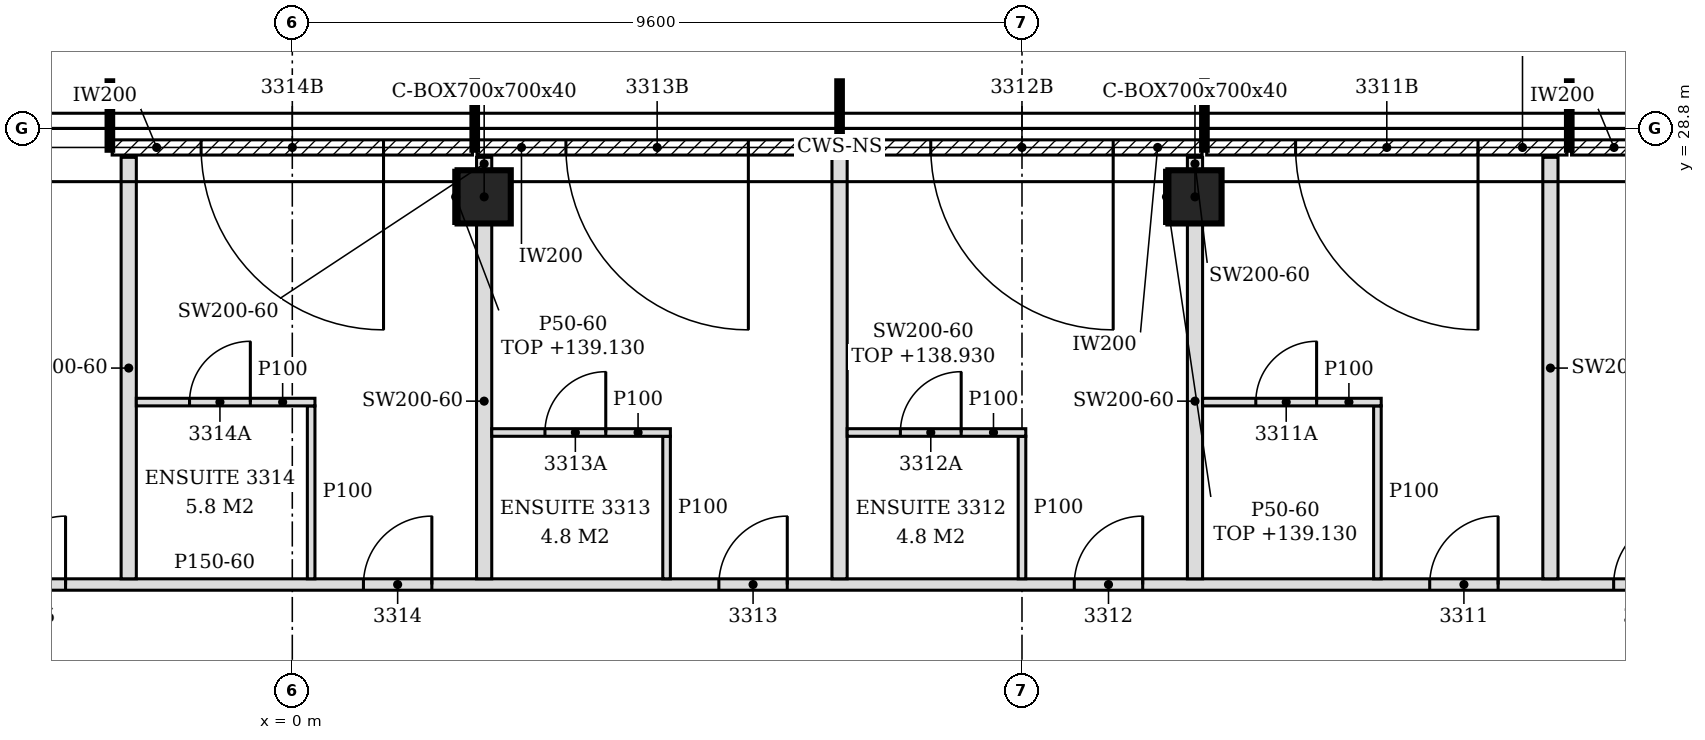
"""IFC4 building model, lengths in metres.
Left out: names, types, materials, properties, quantities, classifications, styles, units other than length and angle.
Written with IfcOpenShell. Run it as: python <this file> out.ifc"""

import sys

from ifc_helpers import new_model, si_unit, direction, frame, frame_2d, origin, origin_2d, place, context, subcontext, project, spatial, polyline, rectangle, hollow_rectangle, outline, extrude, element, fill, save


model = new_model("IFC4")
c1 = context("Model", 3, precision=1e-05, world=origin(), true_north=direction((0.0, 1.0)))
c2 = subcontext(c1, "Body", "Model", "MODEL_VIEW")
j1 = project(units=[si_unit("LENGTHUNIT", "METRE"), si_unit("PLANEANGLEUNIT", "RADIAN")], contexts=[c1])
p1 = place(None, origin())
s1 = spatial("IfcSite", under=j1, at=p1, CompositionType="ELEMENT")
p2 = place(p1, origin())
s2 = spatial("IfcBuilding", under=s1, at=p2, CompositionType="ELEMENT")
p3 = place(p2, frame((0.0, 0.0, 136.2)))
s3 = spatial("IfcBuildingStorey", under=s2, at=p3, CompositionType="ELEMENT", Elevation=136.2)
for number, where, z_axis, x_axis in (
    (1, (11.876, 27.9, -0.15), (0.0, 0.0, 1.0), (1.0, 0.0, 0.0)),
    (2, (2.524, 27.9, -0.15), (0.0, 0.0, 1.0), (1.0, 0.0, 0.0)),
):
    element("IfcColumn", number, at=place(p3, frame(where, z_axis=z_axis, x_axis=x_axis)), inside=s3, PredefinedType="COLUMN", context=c2, shape_type="SweptSolid", body=[
        extrude(hollow_rectangle(XDim=0.7, YDim=0.7, WallThickness=0.04, at=origin_2d()), origin(), (0.0, 0.0, 1.0), 3.6),
    ])
p4 = place(p3, frame((21.457, 28.55, 0.0), z_axis=(0.0, 0.0, 1.0), x_axis=(-1.0, 0.0, 0.0)))
e3 = element("IfcWall", 3, at=p4, inside=s3, PredefinedType="NOTDEFINED", context=c2, shape_type="SweptSolid", body=[
    extrude(rectangle(XDim=4.626, YDim=0.2, at=frame_2d((2.313, 0.0))), origin(), (0.0, 0.0, 1.0), 3.45),
])
p5 = place(p4, frame((1.108, 0.0, 0.0)))
e4 = element("IfcOpeningElement", 4, at=p5, cuts=e3, PredefinedType="OPENING", context=c2, shape_type="SweptSolid", body=[
    extrude(rectangle(XDim=2.4, YDim=2.4, at=frame_2d((1.2, 1.2))), frame((0.0, 0.11, 0.0), z_axis=(0.0, -1.0, 0.0), x_axis=(1.0, 0.0, 0.0)), (0.0, 0.0, 1.0), 0.22),
])
p6 = place(p3, frame((16.77, 28.55, 0.0), z_axis=(0.0, 0.0, 1.0), x_axis=(-1.0, 0.0, 0.0)))
e5 = element("IfcWall", 5, at=p6, inside=s3, PredefinedType="NOTDEFINED", context=c2, shape_type="SweptSolid", body=[
    extrude(rectangle(XDim=4.74, YDim=0.2, at=frame_2d((2.37, 0.0))), origin(), (0.0, 0.0, 1.0), 3.45),
])
p7 = place(p6, frame((1.17, 0.0, 0.0)))
e6 = element("IfcOpeningElement", 6, at=p7, cuts=e5, PredefinedType="OPENING", context=c2, shape_type="SweptSolid", body=[
    extrude(rectangle(XDim=2.4, YDim=2.4, at=frame_2d((1.2, 1.2))), frame((0.0, 0.11, 0.0), z_axis=(0.0, -1.0, 0.0), x_axis=(1.0, 0.0, 0.0)), (0.0, 0.0, 1.0), 0.22),
])
p8 = place(p3, frame((11.97, 28.55, 0.0), z_axis=(0.0, 0.0, 1.0), x_axis=(-1.0, 0.0, 0.0)))
e7 = element("IfcWall", 7, at=p8, inside=s3, PredefinedType="NOTDEFINED", context=c2, shape_type="SweptSolid", body=[
    extrude(rectangle(XDim=4.74, YDim=0.2, at=frame_2d((2.37, 0.0))), origin(), (0.0, 0.0, 1.0), 3.45),
])
p9 = place(p8, frame((1.17, 0.0, 0.0)))
e8 = element("IfcOpeningElement", 8, at=p9, cuts=e7, PredefinedType="OPENING", context=c2, shape_type="SweptSolid", body=[
    extrude(rectangle(XDim=2.4, YDim=2.4, at=frame_2d((1.2, 1.2))), frame((0.0, 0.11, 0.0), z_axis=(0.0, -1.0, 0.0), x_axis=(1.0, 0.0, 0.0)), (0.0, 0.0, 1.0), 0.22),
])
p10 = place(p3, frame((7.17, 28.55, 0.0), z_axis=(0.0, 0.0, 1.0), x_axis=(-1.0, 0.0, 0.0)))
e9 = element("IfcWall", 9, at=p10, inside=s3, PredefinedType="NOTDEFINED", context=c2, shape_type="SweptSolid", body=[
    extrude(rectangle(XDim=4.74, YDim=0.2, at=frame_2d((2.37, 0.0))), origin(), (0.0, 0.0, 1.0), 3.45),
])
p11 = place(p10, frame((1.17, 0.0, 0.0)))
e10 = element("IfcOpeningElement", 10, at=p11, cuts=e9, PredefinedType="OPENING", context=c2, shape_type="SweptSolid", body=[
    extrude(rectangle(XDim=2.4, YDim=2.4, at=frame_2d((1.2, 1.2))), frame((0.0, 0.11, 0.0), z_axis=(0.0, -1.0, 0.0), x_axis=(1.0, 0.0, 0.0)), (0.0, 0.0, 1.0), 0.22),
])
p12 = place(p3, frame((2.37, 28.55, 0.0), z_axis=(0.0, 0.0, 1.0), x_axis=(-1.0, 0.0, 0.0)))
e11 = element("IfcWall", 11, at=p12, inside=s3, PredefinedType="NOTDEFINED", context=c2, shape_type="SweptSolid", body=[
    extrude(rectangle(XDim=4.74, YDim=0.2, at=frame_2d((2.37, 0.0))), origin(), (0.0, 0.0, 1.0), 3.45),
])
p13 = place(p12, frame((1.17, 0.0, 0.0)))
e12 = element("IfcOpeningElement", 12, at=p13, cuts=e11, PredefinedType="OPENING", context=c2, shape_type="SweptSolid", body=[
    extrude(rectangle(XDim=2.4, YDim=2.4, at=frame_2d((1.2, 1.2))), frame((0.0, 0.11, 0.0), z_axis=(0.0, -1.0, 0.0), x_axis=(1.0, 0.0, 0.0)), (0.0, 0.0, 1.0), 0.22),
])
p14 = place(p3, frame((-4.821, 22.8, 0.0), z_axis=(0.0, 0.0, 1.0), x_axis=(1.0, 0.0, 0.0)))
e13 = element("IfcWall", 13, at=p14, inside=s3, PredefinedType="PARTITIONING", context=c2, shape_type="SweptSolid", body=[
    extrude(outline(polyline([(0.0, 0.0), (24.042, 0.0), (24.042, 2.73), (23.871, 2.73), (23.869, 3.45), (12.171, 3.45), (12.169, 2.73), (11.871, 2.73), (11.869, 3.45), (0.171, 3.45), (0.169, 2.73), (0.0, 2.73), (0.0, 0.0)])), frame((0.0, 0.075, 0.0), z_axis=(0.0, -1.0, 0.0), x_axis=(1.0, 0.0, 0.0)), (0.0, 0.0, 1.0), 0.15),
])
p15 = place(p14, frame((22.205, 0.0, 0.0)))
e14 = element("IfcOpeningElement", 14, at=p15, cuts=e13, PredefinedType="OPENING", context=c2, shape_type="SweptSolid", body=[
    extrude(rectangle(XDim=0.9, YDim=2.1, at=frame_2d((0.45, 1.05))), frame((0.0, 0.085, 0.0), z_axis=(0.0, -1.0, 0.0), x_axis=(1.0, 0.0, 0.0)), (0.0, 0.0, 1.0), 0.17),
])
p16 = place(p14, frame((19.785, 0.0, 0.0)))
e15 = element("IfcOpeningElement", 15, at=p16, cuts=e13, PredefinedType="OPENING", context=c2, shape_type="SweptSolid", body=[
    extrude(rectangle(XDim=0.9, YDim=2.1, at=frame_2d((0.45, 1.05))), frame((0.0, 0.085, 0.0), z_axis=(0.0, -1.0, 0.0), x_axis=(1.0, 0.0, 0.0)), (0.0, 0.0, 1.0), 0.17),
])
p17 = place(p14, frame((15.109, 0.0, 0.0)))
e16 = element("IfcOpeningElement", 16, at=p17, cuts=e13, PredefinedType="OPENING", context=c2, shape_type="SweptSolid", body=[
    extrude(rectangle(XDim=0.9, YDim=2.1, at=frame_2d((0.45, 1.05))), frame((0.0, 0.085, 0.0), z_axis=(0.0, -1.0, 0.0), x_axis=(1.0, 0.0, 0.0)), (0.0, 0.0, 1.0), 0.17),
])
p18 = place(p14, frame((10.433, 0.0, 0.0)))
e17 = element("IfcOpeningElement", 17, at=p18, cuts=e13, PredefinedType="OPENING", context=c2, shape_type="SweptSolid", body=[
    extrude(rectangle(XDim=0.9, YDim=2.1, at=frame_2d((0.45, 1.05))), frame((0.0, 0.085, 0.0), z_axis=(0.0, -1.0, 0.0), x_axis=(1.0, 0.0, 0.0)), (0.0, 0.0, 1.0), 0.17),
])
p19 = place(p14, frame((5.757, 0.0, 0.0)))
e18 = element("IfcOpeningElement", 18, at=p19, cuts=e13, PredefinedType="OPENING", context=c2, shape_type="SweptSolid", body=[
    extrude(rectangle(XDim=0.9, YDim=2.1, at=frame_2d((0.45, 1.05))), frame((0.0, 0.085, 0.0), z_axis=(0.0, -1.0, 0.0), x_axis=(1.0, 0.0, 0.0)), (0.0, 0.0, 1.0), 0.17),
])
p20 = place(p14, frame((0.938, 0.0, 0.0)))
e19 = element("IfcOpeningElement", 19, at=p20, cuts=e13, PredefinedType="OPENING", context=c2, shape_type="SweptSolid", body=[
    extrude(rectangle(XDim=0.9, YDim=2.1, at=frame_2d((0.45, 1.05))), frame((0.0, 0.085, 0.0), z_axis=(0.0, -1.0, 0.0), x_axis=(1.0, 0.0, 0.0)), (0.0, 0.0, 1.0), 0.17),
])
p21 = place(p3, frame((-2.152, 22.875, 0.0), z_axis=(0.0, 0.0, 1.0), x_axis=(0.0, 1.0, 0.0)))
e20 = element("IfcWall", 20, at=p21, inside=s3, PredefinedType="PARTITIONING", context=c2, shape_type="SweptSolid", body=[
    extrude(outline(polyline([(0.0, 0.0), (5.545, 0.0), (5.545, 3.45), (5.175, 3.45), (5.173, 2.93), (4.875, 2.93), (4.873, 3.45), (1.23, 3.45), (1.228, 2.88), (1.02, 2.88), (1.018, 3.45), (0.0, 3.45), (0.0, 0.0)])), frame((0.0, 0.1, 0.0), z_axis=(0.0, -1.0, 0.0), x_axis=(1.0, 0.0, 0.0)), (0.0, 0.0, 1.0), 0.2),
])
p22 = place(p3, frame((0.248, 22.875, 0.0), z_axis=(0.0, 0.0, 1.0), x_axis=(0.0, 1.0, 0.0)))
e21 = element("IfcWall", 21, at=p22, inside=s3, PredefinedType="PARTITIONING", context=c2, shape_type="SweptSolid", body=[
    extrude(outline(polyline([(0.0, 0.0), (2.275, 0.0), (2.275, 3.45), (1.23, 3.45), (1.228, 2.88), (1.02, 2.88), (1.018, 3.45), (0.0, 3.45), (0.0, 0.0)])), frame((0.0, 0.05, 0.0), z_axis=(0.0, -1.0, 0.0), x_axis=(1.0, 0.0, 0.0)), (0.0, 0.0, 1.0), 0.1),
])
p23 = place(p3, frame((2.524, 22.875, 0.0), z_axis=(0.0, 0.0, 1.0), x_axis=(0.0, 1.0, 0.0)))
e22 = element("IfcWall", 22, at=p23, inside=s3, PredefinedType="PARTITIONING", context=c2, shape_type="SweptSolid", body=[
    extrude(outline(polyline([(0.0, 0.0), (4.675, 0.0), (4.675, 3.45), (1.23, 3.45), (1.228, 2.88), (1.02, 2.88), (1.018, 3.45), (0.0, 3.45), (0.0, 0.0)])), frame((0.0, 0.1, 0.0), z_axis=(0.0, -1.0, 0.0), x_axis=(1.0, 0.0, 0.0)), (0.0, 0.0, 1.0), 0.2),
])
p24 = place(p3, frame((4.924, 22.875, 0.0), z_axis=(0.0, 0.0, 1.0), x_axis=(0.0, 1.0, 0.0)))
e23 = element("IfcWall", 23, at=p24, inside=s3, PredefinedType="PARTITIONING", context=c2, shape_type="SweptSolid", body=[
    extrude(outline(polyline([(0.0, 0.0), (1.875, 0.0), (1.875, 3.45), (1.23, 3.45), (1.228, 2.88), (1.02, 2.88), (1.018, 3.45), (0.0, 3.45), (0.0, 0.0)])), frame((0.0, 0.05, 0.0), z_axis=(0.0, -1.0, 0.0), x_axis=(1.0, 0.0, 0.0)), (0.0, 0.0, 1.0), 0.1),
])
p25 = place(p3, frame((7.2, 22.875, 0.0), z_axis=(0.0, 0.0, 1.0), x_axis=(0.0, 1.0, 0.0)))
e24 = element("IfcWall", 24, at=p25, inside=s3, PredefinedType="PARTITIONING", context=c2, shape_type="SweptSolid", body=[
    extrude(rectangle(XDim=5.575, YDim=0.2, at=frame_2d((2.788, 0.0))), origin(), (0.0, 0.0, 1.0), 2.73),
])
p26 = place(p3, frame((9.6, 22.875, 0.0), z_axis=(0.0, 0.0, 1.0), x_axis=(0.0, 1.0, 0.0)))
e25 = element("IfcWall", 25, at=p26, inside=s3, PredefinedType="PARTITIONING", context=c2, shape_type="SweptSolid", body=[
    extrude(outline(polyline([(0.0, 0.0), (1.875, 0.0), (1.875, 3.45), (1.23, 3.45), (1.228, 2.88), (1.02, 2.88), (1.018, 3.45), (0.0, 3.45), (0.0, 0.0)])), frame((0.0, 0.05, 0.0), z_axis=(0.0, -1.0, 0.0), x_axis=(1.0, 0.0, 0.0)), (0.0, 0.0, 1.0), 0.1),
])
p27 = place(p3, frame((11.876, 22.875, 0.0), z_axis=(0.0, 0.0, 1.0), x_axis=(0.0, 1.0, 0.0)))
e26 = element("IfcWall", 26, at=p27, inside=s3, PredefinedType="PARTITIONING", context=c2, shape_type="SweptSolid", body=[
    extrude(outline(polyline([(0.0, 0.0), (4.675, 0.0), (4.675, 3.45), (1.23, 3.45), (1.228, 2.88), (1.02, 2.88), (1.018, 3.45), (0.0, 3.45), (0.0, 0.0)])), frame((0.0, 0.1, 0.0), z_axis=(0.0, -1.0, 0.0), x_axis=(1.0, 0.0, 0.0)), (0.0, 0.0, 1.0), 0.2),
])
p28 = place(p3, frame((14.276, 22.875, 0.0), z_axis=(0.0, 0.0, 1.0), x_axis=(0.0, 1.0, 0.0)))
e27 = element("IfcWall", 27, at=p28, inside=s3, PredefinedType="PARTITIONING", context=c2, shape_type="SweptSolid", body=[
    extrude(outline(polyline([(0.0, 0.0), (2.275, 0.0), (2.275, 3.45), (1.23, 3.45), (1.228, 2.88), (1.02, 2.88), (1.018, 3.45), (0.0, 3.45), (0.0, 0.0)])), frame((0.0, 0.05, 0.0), z_axis=(0.0, -1.0, 0.0), x_axis=(1.0, 0.0, 0.0)), (0.0, 0.0, 1.0), 0.1),
])
p29 = place(p3, frame((16.552, 22.875, 0.0), z_axis=(0.0, 0.0, 1.0), x_axis=(0.0, 1.0, 0.0)))
e28 = element("IfcWall", 28, at=p29, inside=s3, PredefinedType="PARTITIONING", context=c2, shape_type="SweptSolid", body=[
    extrude(outline(polyline([(0.0, 0.0), (5.545, 0.0), (5.545, 3.45), (5.175, 3.45), (5.173, 2.93), (4.875, 2.93), (4.873, 3.45), (1.23, 3.45), (1.228, 2.88), (1.02, 2.88), (1.018, 3.45), (0.0, 3.45), (0.0, 0.0)])), frame((0.0, 0.1, 0.0), z_axis=(0.0, -1.0, 0.0), x_axis=(1.0, 0.0, 0.0)), (0.0, 0.0, 1.0), 0.2),
])
p30 = place(p3, frame((2.624, 24.8, 0.0), z_axis=(0.0, 0.0, 1.0), x_axis=(1.0, 0.0, 0.0)))
e29 = element("IfcWall", 29, at=p30, inside=s3, PredefinedType="PARTITIONING", context=c2, shape_type="SweptSolid", body=[
    extrude(rectangle(XDim=2.35, YDim=0.1, at=frame_2d((1.175, 0.0))), origin(), (0.0, 0.0, 1.0), 3.45),
])
p31 = place(p30, frame((0.7, 0.0, 0.0)))
e30 = element("IfcOpeningElement", 30, at=p31, cuts=e29, PredefinedType="OPENING", context=c2, shape_type="SweptSolid", body=[
    extrude(rectangle(XDim=0.8, YDim=2.1, at=frame_2d((0.4, 1.05))), frame((0.0, 0.06, 0.0), z_axis=(0.0, -1.0, 0.0), x_axis=(1.0, 0.0, 0.0)), (0.0, 0.0, 1.0), 0.12),
])
p32 = place(p3, frame((7.3, 24.8, 0.0), z_axis=(0.0, 0.0, 1.0), x_axis=(1.0, 0.0, 0.0)))
e31 = element("IfcWall", 31, at=p32, inside=s3, PredefinedType="PARTITIONING", context=c2, shape_type="SweptSolid", body=[
    extrude(outline(polyline([(0.0, 0.0), (2.35, 0.0), (2.35, 3.45), (0.05, 3.45), (0.048, 2.73), (0.0, 2.73), (0.0, 0.0)])), frame((0.0, 0.05, 0.0), z_axis=(0.0, -1.0, 0.0), x_axis=(1.0, 0.0, 0.0)), (0.0, 0.0, 1.0), 0.1),
])
p33 = place(p32, frame((0.7, 0.0, 0.0)))
e32 = element("IfcOpeningElement", 32, at=p33, cuts=e31, PredefinedType="OPENING", context=c2, shape_type="SweptSolid", body=[
    extrude(rectangle(XDim=0.8, YDim=2.1, at=frame_2d((0.4, 1.05))), frame((0.0, 0.06, 0.0), z_axis=(0.0, -1.0, 0.0), x_axis=(1.0, 0.0, 0.0)), (0.0, 0.0, 1.0), 0.12),
])
p34 = place(p3, frame((-2.052, 25.2, 0.0), z_axis=(0.0, 0.0, 1.0), x_axis=(1.0, 0.0, 0.0)))
e33 = element("IfcWall", 33, at=p34, inside=s3, PredefinedType="PARTITIONING", context=c2, shape_type="SweptSolid", body=[
    extrude(rectangle(XDim=2.35, YDim=0.1, at=frame_2d((1.175, 0.0))), origin(), (0.0, 0.0, 1.0), 3.45),
])
p35 = place(p34, frame((0.7, 0.0, 0.0)))
e34 = element("IfcOpeningElement", 34, at=p35, cuts=e33, PredefinedType="OPENING", context=c2, shape_type="SweptSolid", body=[
    extrude(rectangle(XDim=0.8, YDim=2.1, at=frame_2d((0.4, 1.05))), frame((0.0, 0.06, 0.0), z_axis=(0.0, -1.0, 0.0), x_axis=(1.0, 0.0, 0.0)), (0.0, 0.0, 1.0), 0.12),
])
p36 = place(p3, frame((11.976, 25.2, 0.0), z_axis=(0.0, 0.0, 1.0), x_axis=(1.0, 0.0, 0.0)))
e35 = element("IfcWall", 35, at=p36, inside=s3, PredefinedType="PARTITIONING", context=c2, shape_type="SweptSolid", body=[
    extrude(rectangle(XDim=2.35, YDim=0.1, at=frame_2d((1.175, 0.0))), origin(), (0.0, 0.0, 1.0), 3.45),
])
p37 = place(p36, frame((0.7, 0.0, 0.0)))
e36 = element("IfcOpeningElement", 36, at=p37, cuts=e35, PredefinedType="OPENING", context=c2, shape_type="SweptSolid", body=[
    extrude(rectangle(XDim=0.8, YDim=2.1, at=frame_2d((0.4, 1.05))), frame((0.0, 0.06, 0.0), z_axis=(0.0, -1.0, 0.0), x_axis=(1.0, 0.0, 0.0)), (0.0, 0.0, 1.0), 0.12),
])
for number, where, z_axis, x_axis in (
    (37, (2.524, 28.25, 0.0), (0.0, 0.0, 1.0), (0.0, 1.0, 0.0)),
    (38, (11.876, 28.25, 0.0), (0.0, 0.0, 1.0), (0.0, 1.0, 0.0)),
):
    element("IfcWall", number, at=place(p3, frame(where, z_axis=z_axis, x_axis=x_axis)), inside=s3, PredefinedType="PARTITIONING", context=c2, shape_type="SweptSolid", body=[
        extrude(rectangle(XDim=0.17, YDim=0.2, at=frame_2d((0.085, 0.0))), origin(), (0.0, 0.0, 1.0), 3.45),
    ])
for number, where, z_axis, x_axis in (
    (39, (2.149, 27.55, 0.0), (0.0, 0.0, 1.0), (0.0, 1.0, 0.0)),
    (40, (11.501, 27.55, 0.0), (0.0, 0.0, 1.0), (0.0, 1.0, 0.0)),
):
    element("IfcWall", number, at=place(p3, frame(where, z_axis=z_axis, x_axis=x_axis)), inside=s3, PredefinedType="PARTITIONING", context=c2, shape_type="SweptSolid", body=[
        extrude(rectangle(XDim=0.7, YDim=0.05, at=frame_2d((0.35, 0.0))), origin(), (0.0, 0.0, 1.0), 2.93),
    ])
p38 = place(p7, origin())
e41 = element("IfcDoor", 41, at=p38, inside=s3, OperationType="SINGLE_SWING_LEFT", PredefinedType="DOOR", context=c2, shape_type="SweptSolid", body=[
    extrude(rectangle(XDim=2.4, YDim=2.4, at=frame_2d((1.2, 1.2))), frame((0.0, 0.025, 0.0), z_axis=(0.0, -1.0, 0.0), x_axis=(1.0, 0.0, 0.0)), (0.0, 0.0, 1.0), 0.05),
])
fill(e6, e41)
p39 = place(p9, origin())
e42 = element("IfcDoor", 42, at=p39, inside=s3, OperationType="SINGLE_SWING_LEFT", PredefinedType="DOOR", context=c2, shape_type="SweptSolid", body=[
    extrude(rectangle(XDim=2.4, YDim=2.4, at=frame_2d((1.2, 1.2))), frame((0.0, 0.025, 0.0), z_axis=(0.0, -1.0, 0.0), x_axis=(1.0, 0.0, 0.0)), (0.0, 0.0, 1.0), 0.05),
])
fill(e8, e42)
p40 = place(p11, origin())
e43 = element("IfcDoor", 43, at=p40, inside=s3, OperationType="SINGLE_SWING_LEFT", PredefinedType="DOOR", context=c2, shape_type="SweptSolid", body=[
    extrude(rectangle(XDim=2.4, YDim=2.4, at=frame_2d((1.2, 1.2))), frame((0.0, 0.025, 0.0), z_axis=(0.0, -1.0, 0.0), x_axis=(1.0, 0.0, 0.0)), (0.0, 0.0, 1.0), 0.05),
])
fill(e10, e43)
p41 = place(p13, origin())
e44 = element("IfcDoor", 44, at=p41, inside=s3, OperationType="SINGLE_SWING_LEFT", PredefinedType="DOOR", context=c2, shape_type="SweptSolid", body=[
    extrude(rectangle(XDim=2.4, YDim=2.4, at=frame_2d((1.2, 1.2))), frame((0.0, 0.025, 0.0), z_axis=(0.0, -1.0, 0.0), x_axis=(1.0, 0.0, 0.0)), (0.0, 0.0, 1.0), 0.05),
])
fill(e12, e44)
p42 = place(p15, origin())
e45 = element("IfcDoor", 45, at=p42, inside=s3, OperationType="SINGLE_SWING_RIGHT", PredefinedType="DOOR", context=c2, shape_type="SweptSolid", body=[
    extrude(rectangle(XDim=0.9, YDim=2.1, at=frame_2d((0.45, 1.05))), frame((0.0, 0.025, 0.0), z_axis=(0.0, -1.0, 0.0), x_axis=(1.0, 0.0, 0.0)), (0.0, 0.0, 1.0), 0.05),
])
fill(e14, e45)
p43 = place(p16, origin())
e46 = element("IfcDoor", 46, at=p43, inside=s3, OperationType="SINGLE_SWING_RIGHT", PredefinedType="DOOR", context=c2, shape_type="SweptSolid", body=[
    extrude(rectangle(XDim=0.9, YDim=2.1, at=frame_2d((0.45, 1.05))), frame((0.0, 0.025, 0.0), z_axis=(0.0, -1.0, 0.0), x_axis=(1.0, 0.0, 0.0)), (0.0, 0.0, 1.0), 0.05),
])
fill(e15, e46)
p44 = place(p37, origin())
e47 = element("IfcDoor", 47, at=p44, inside=s3, OperationType="SINGLE_SWING_RIGHT", PredefinedType="DOOR", context=c2, shape_type="SweptSolid", body=[
    extrude(rectangle(XDim=0.8, YDim=2.1, at=frame_2d((0.4, 1.05))), frame((0.0, 0.025, 0.0), z_axis=(0.0, -1.0, 0.0), x_axis=(1.0, 0.0, 0.0)), (0.0, 0.0, 1.0), 0.05),
])
fill(e36, e47)
p45 = place(p17, origin())
e48 = element("IfcDoor", 48, at=p45, inside=s3, OperationType="SINGLE_SWING_RIGHT", PredefinedType="DOOR", context=c2, shape_type="SweptSolid", body=[
    extrude(rectangle(XDim=0.9, YDim=2.1, at=frame_2d((0.45, 1.05))), frame((0.0, 0.025, 0.0), z_axis=(0.0, -1.0, 0.0), x_axis=(1.0, 0.0, 0.0)), (0.0, 0.0, 1.0), 0.05),
])
fill(e16, e48)
p46 = place(p33, origin())
e49 = element("IfcDoor", 49, at=p46, inside=s3, OperationType="SINGLE_SWING_RIGHT", PredefinedType="DOOR", context=c2, shape_type="SweptSolid", body=[
    extrude(rectangle(XDim=0.8, YDim=2.1, at=frame_2d((0.4, 1.05))), frame((0.0, 0.025, 0.0), z_axis=(0.0, -1.0, 0.0), x_axis=(1.0, 0.0, 0.0)), (0.0, 0.0, 1.0), 0.05),
])
fill(e32, e49)
p47 = place(p18, origin())
e50 = element("IfcDoor", 50, at=p47, inside=s3, OperationType="SINGLE_SWING_RIGHT", PredefinedType="DOOR", context=c2, shape_type="SweptSolid", body=[
    extrude(rectangle(XDim=0.9, YDim=2.1, at=frame_2d((0.45, 1.05))), frame((0.0, 0.025, 0.0), z_axis=(0.0, -1.0, 0.0), x_axis=(1.0, 0.0, 0.0)), (0.0, 0.0, 1.0), 0.05),
])
fill(e17, e50)
p48 = place(p31, origin())
e51 = element("IfcDoor", 51, at=p48, inside=s3, OperationType="SINGLE_SWING_RIGHT", PredefinedType="DOOR", context=c2, shape_type="SweptSolid", body=[
    extrude(rectangle(XDim=0.8, YDim=2.1, at=frame_2d((0.4, 1.05))), frame((0.0, 0.025, 0.0), z_axis=(0.0, -1.0, 0.0), x_axis=(1.0, 0.0, 0.0)), (0.0, 0.0, 1.0), 0.05),
])
fill(e30, e51)
p49 = place(p19, origin())
e52 = element("IfcDoor", 52, at=p49, inside=s3, OperationType="SINGLE_SWING_RIGHT", PredefinedType="DOOR", context=c2, shape_type="SweptSolid", body=[
    extrude(rectangle(XDim=0.9, YDim=2.1, at=frame_2d((0.45, 1.05))), frame((0.0, 0.025, 0.0), z_axis=(0.0, -1.0, 0.0), x_axis=(1.0, 0.0, 0.0)), (0.0, 0.0, 1.0), 0.05),
])
fill(e18, e52)
p50 = place(p35, origin())
e53 = element("IfcDoor", 53, at=p50, inside=s3, OperationType="SINGLE_SWING_RIGHT", PredefinedType="DOOR", context=c2, shape_type="SweptSolid", body=[
    extrude(rectangle(XDim=0.8, YDim=2.1, at=frame_2d((0.4, 1.05))), frame((0.0, 0.025, 0.0), z_axis=(0.0, -1.0, 0.0), x_axis=(1.0, 0.0, 0.0)), (0.0, 0.0, 1.0), 0.05),
])
fill(e34, e53)
p51 = place(p20, origin())
e54 = element("IfcDoor", 54, at=p51, inside=s3, OperationType="SINGLE_SWING_RIGHT", PredefinedType="DOOR", context=c2, shape_type="SweptSolid", body=[
    extrude(rectangle(XDim=0.9, YDim=2.1, at=frame_2d((0.45, 1.05))), frame((0.0, 0.025, 0.0), z_axis=(0.0, -1.0, 0.0), x_axis=(1.0, 0.0, 0.0)), (0.0, 0.0, 1.0), 0.05),
])
fill(e19, e54)
save(model, sys.argv[1])
